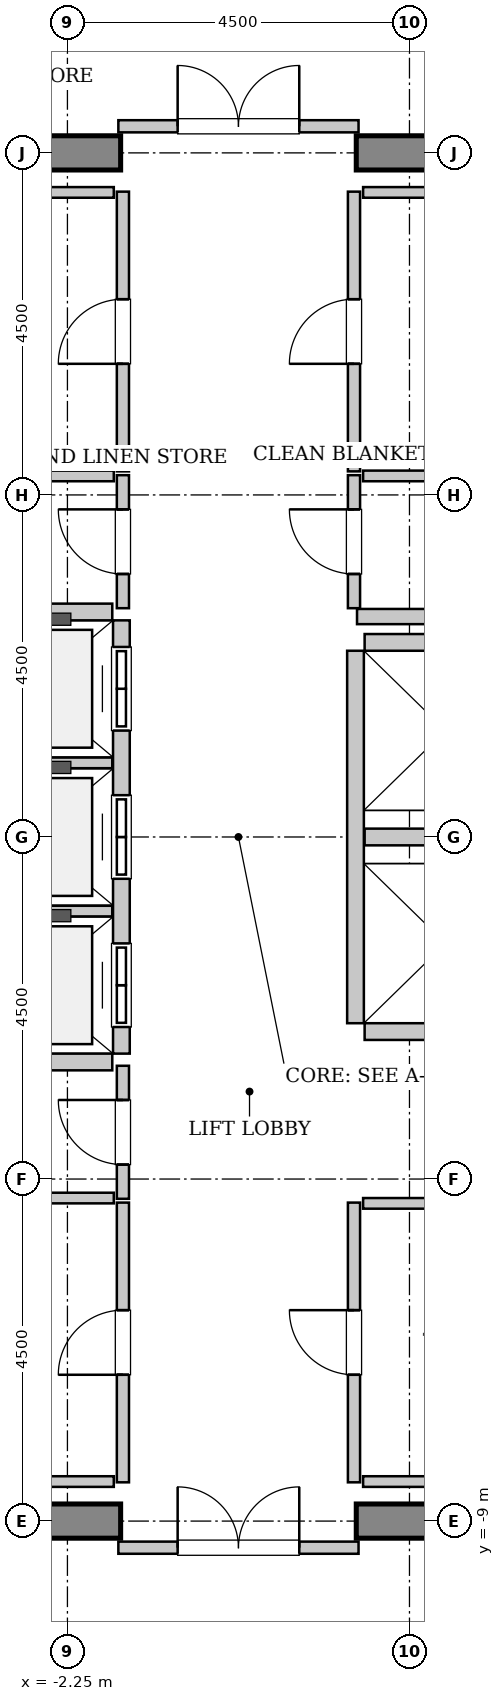
"""IFC4 building model, lengths in metres.
Left out: names, types, materials, properties, quantities, classifications, styles, units other than length and angle.
Written with IfcOpenShell. Run it as: python <this file> out.ifc"""

import sys

from ifc_helpers import new_model, si_unit, direction, frame, frame_2d, origin, place, context, subcontext, project, spatial, rectangle, extrude, source, transform, mapped, element, fill, save


model = new_model("IFC4")
c1 = context("Model", 3, precision=1e-05, world=origin(), true_north=direction((0.0, 1.0)))
c2 = subcontext(c1, "Body", "Model", "MODEL_VIEW")
j1 = project(units=[si_unit("LENGTHUNIT", "METRE"), si_unit("PLANEANGLEUNIT", "RADIAN")], contexts=[c1])
p1 = place(None, origin())
s1 = spatial("IfcSite", under=j1, at=p1, CompositionType="ELEMENT")
p2 = place(p1, origin())
s2 = spatial("IfcBuilding", under=s1, at=p2, CompositionType="ELEMENT")
p3 = place(p2, frame((0.0, 0.0, 268.4)))
s3 = spatial("IfcBuildingStorey", under=s2, at=p3, CompositionType="ELEMENT", Elevation=268.4)
m1 = source(origin(), c2, "Body", "SweptSolid", [
    extrude(rectangle(XDim=9.925, YDim=0.45, at=frame_2d((4.962, 0.0))), origin(), (0.0, 0.0, 1.0), 3.8),
])
for number, where, z_axis, x_axis in (
    (1, (-11.475, 9.0, 0.0), (0.0, 0.0, 1.0), (1.0, 0.0, 0.0)),
    (2, (1.55, 9.0, 0.0), (0.0, 0.0, 1.0), (1.0, 0.0, 0.0)),
    (3, (-11.475, -9.0, 0.0), (0.0, 0.0, 1.0), (1.0, 0.0, 0.0)),
    (4, (1.55, -9.0, 0.0), (0.0, 0.0, 1.0), (1.0, 0.0, 0.0)),
):
    element("IfcWall", number, at=place(p3, frame(where, z_axis=z_axis, x_axis=x_axis)), inside=s3, PredefinedType="SHEAR", context=c2, shape_type="MappedRepresentation", body=[
        mapped(m1, transform((0.0, 0.0, 0.0), x_axis=(1.0, 0.0, 0.0), y_axis=(0.0, 1.0, 0.0), z_axis=(0.0, 0.0, 1.0), scale=1.0)),
    ])
m2 = source(origin(), c2, "Body", "SweptSolid", [
    extrude(rectangle(XDim=5.7, YDim=0.22, at=frame_2d((2.85, 0.0))), origin(), (0.0, 0.0, 1.0), 3.535),
])
p4 = place(p3, frame((-1.54, -2.85, 0.0), z_axis=(0.0, 0.0, 1.0), x_axis=(0.0, 1.0, 0.0)))
e5 = element("IfcWall", 5, at=p4, inside=s3, PredefinedType="SOLIDWALL", context=c2, shape_type="MappedRepresentation", body=[
    mapped(m2, transform((0.0, 0.0, 0.0), x_axis=(1.0, 0.0, 0.0), y_axis=(0.0, 1.0, 0.0), z_axis=(0.0, 0.0, 1.0), scale=1.0)),
])
p5 = place(p4, frame((0.35, 0.0, 0.0)))
e6 = element("IfcOpeningElement", 6, at=p5, cuts=e5, PredefinedType="OPENING", context=c2, shape_type="SweptSolid", body=[
    extrude(rectangle(XDim=1.1, YDim=2.2, at=frame_2d((0.55, 1.1))), frame((0.0, 0.12, 0.0), z_axis=(0.0, -1.0, 0.0), x_axis=(1.0, 0.0, 0.0)), (0.0, 0.0, 1.0), 0.24),
])
p6 = place(p4, frame((2.3, 0.0, 0.0)))
e7 = element("IfcOpeningElement", 7, at=p6, cuts=e5, PredefinedType="OPENING", context=c2, shape_type="SweptSolid", body=[
    extrude(rectangle(XDim=1.1, YDim=2.2, at=frame_2d((0.55, 1.1))), frame((0.0, 0.12, 0.0), z_axis=(0.0, -1.0, 0.0), x_axis=(1.0, 0.0, 0.0)), (0.0, 0.0, 1.0), 0.24),
])
p7 = place(p4, frame((4.25, 0.0, 0.0)))
e8 = element("IfcOpeningElement", 8, at=p7, cuts=e5, PredefinedType="OPENING", context=c2, shape_type="SweptSolid", body=[
    extrude(rectangle(XDim=1.1, YDim=2.2, at=frame_2d((0.55, 1.1))), frame((0.0, 0.12, 0.0), z_axis=(0.0, -1.0, 0.0), x_axis=(1.0, 0.0, 0.0)), (0.0, 0.0, 1.0), 0.24),
])
m3 = source(origin(), c2, "Body", "SweptSolid", [
    extrude(rectangle(XDim=2.13, YDim=0.22, at=frame_2d((1.065, 0.0))), origin(), (0.0, 0.0, 1.0), 3.535),
])
p8 = place(p3, frame((-3.79, -2.96, 0.0), z_axis=(0.0, 0.0, 1.0), x_axis=(1.0, 0.0, 0.0)))
e9 = element("IfcWall", 9, at=p8, inside=s3, PredefinedType="SOLIDWALL", context=c2, shape_type="MappedRepresentation", body=[
    mapped(m3, transform((0.0, 0.0, 0.0), x_axis=(1.0, 0.0, 0.0), y_axis=(0.0, 1.0, 0.0), z_axis=(0.0, 0.0, 1.0), scale=1.0)),
])
m4 = source(origin(), c2, "Body", "SweptSolid", [
    extrude(rectangle(XDim=2.13, YDim=0.14, at=frame_2d((1.065, 0.0))), origin(), (0.0, 0.0, 1.0), 3.535),
])
for number, where, z_axis, x_axis in (
    (10, (-3.79, -0.975, 0.0), (0.0, 0.0, 1.0), (1.0, 0.0, 0.0)),
    (11, (-3.79, 0.975, 0.0), (0.0, 0.0, 1.0), (1.0, 0.0, 0.0)),
):
    element("IfcWall", number, at=place(p3, frame(where, z_axis=z_axis, x_axis=x_axis)), inside=s3, PredefinedType="PARTITIONING", context=c2, shape_type="MappedRepresentation", body=[
        mapped(m4, transform((0.0, 0.0, 0.0), x_axis=(1.0, 0.0, 0.0), y_axis=(0.0, 1.0, 0.0), z_axis=(0.0, 0.0, 1.0), scale=1.0)),
    ])
p9 = place(p3, frame((-1.66, 2.96, 0.0), z_axis=(0.0, 0.0, 1.0), x_axis=(-1.0, 0.0, 0.0)))
e12 = element("IfcWall", 12, at=p9, inside=s3, PredefinedType="SOLIDWALL", context=c2, shape_type="MappedRepresentation", body=[
    mapped(m3, transform((0.0, 0.0, 0.0), x_axis=(1.0, 0.0, 0.0), y_axis=(0.0, 1.0, 0.0), z_axis=(0.0, 0.0, 1.0), scale=1.0)),
])
m5 = source(origin(), c2, "Body", "SweptSolid", [
    extrude(rectangle(XDim=4.9, YDim=0.22, at=frame_2d((2.45, 0.0))), origin(), (0.0, 0.0, 1.0), 3.535),
])
p10 = place(p3, frame((1.54, 2.45, 0.0), z_axis=(0.0, 0.0, 1.0), x_axis=(0.0, -1.0, 0.0)))
e13 = element("IfcWall", 13, at=p10, inside=s3, PredefinedType="SOLIDWALL", context=c2, shape_type="MappedRepresentation", body=[
    mapped(m5, transform((0.0, 0.0, 0.0), x_axis=(1.0, 0.0, 0.0), y_axis=(0.0, 1.0, 0.0), z_axis=(0.0, 0.0, 1.0), scale=1.0)),
])
for number, where, z_axis, x_axis in (
    (14, (1.66, -2.56, 0.0), (0.0, 0.0, 1.0), (1.0, 0.0, 0.0)),
    (15, (1.66, 0.0, 0.0), (0.0, 0.0, 1.0), (1.0, 0.0, 0.0)),
    (16, (3.79, 2.56, 0.0), (0.0, 0.0, 1.0), (-1.0, 0.0, 0.0)),
):
    element("IfcWall", number, at=place(p3, frame(where, z_axis=z_axis, x_axis=x_axis)), inside=s3, PredefinedType="SOLIDWALL", context=c2, shape_type="MappedRepresentation", body=[
        mapped(m3, transform((0.0, 0.0, 0.0), x_axis=(1.0, 0.0, 0.0), y_axis=(0.0, 1.0, 0.0), z_axis=(0.0, 0.0, 1.0), scale=1.0)),
    ])
m6 = source(origin(), c2, "Body", "SweptSolid", [
    extrude(rectangle(XDim=2.52, YDim=0.2, at=frame_2d((1.26, 0.0))), origin(), (0.0, 0.0, 1.0), 3.535),
])
p11 = place(p3, frame((1.56, 2.9, 0.0), z_axis=(0.0, 0.0, 1.0), x_axis=(1.0, 0.0, 0.0)))
e17 = element("IfcWall", 17, at=p11, inside=s3, PredefinedType="PARTITIONING", context=c2, shape_type="MappedRepresentation", body=[
    mapped(m6, transform((0.0, 0.0, 0.0), x_axis=(1.0, 0.0, 0.0), y_axis=(0.0, 1.0, 0.0), z_axis=(0.0, 0.0, 1.0), scale=1.0)),
])
m7 = source(origin(), c2, "Body", "SweptSolid", [
    extrude(rectangle(XDim=3.16, YDim=0.16, at=frame_2d((1.58, 0.0))), origin(), (0.0, 0.0, 1.0), 2.625),
])
p12 = place(p3, frame((-1.58, 9.35, 0.0), z_axis=(0.0, 0.0, 1.0), x_axis=(1.0, 0.0, 0.0)))
e18 = element("IfcWall", 18, at=p12, inside=s3, PredefinedType="PARTITIONING", context=c2, shape_type="MappedRepresentation", body=[
    mapped(m7, transform((0.0, 0.0, 0.0), x_axis=(1.0, 0.0, 0.0), y_axis=(0.0, 1.0, 0.0), z_axis=(0.0, 0.0, 1.0), scale=1.0)),
])
p13 = place(p12, frame((0.78, 0.0, 0.0)))
e19 = element("IfcOpeningElement", 19, at=p13, cuts=e18, PredefinedType="OPENING", context=c2, shape_type="SweptSolid", body=[
    extrude(rectangle(XDim=1.6, YDim=2.3, at=frame_2d((0.8, 1.15))), frame((0.0, 0.09, 0.0), z_axis=(0.0, -1.0, 0.0), x_axis=(1.0, 0.0, 0.0)), (0.0, 0.0, 1.0), 0.18),
])
p14 = place(p3, frame((-1.58, -9.35, 0.0), z_axis=(0.0, 0.0, 1.0), x_axis=(1.0, 0.0, 0.0)))
e20 = element("IfcWall", 20, at=p14, inside=s3, PredefinedType="PARTITIONING", context=c2, shape_type="MappedRepresentation", body=[
    mapped(m7, transform((0.0, 0.0, 0.0), x_axis=(1.0, 0.0, 0.0), y_axis=(0.0, 1.0, 0.0), z_axis=(0.0, 0.0, 1.0), scale=1.0)),
])
p15 = place(p14, frame((0.78, 0.0, 0.0)))
e21 = element("IfcOpeningElement", 21, at=p15, cuts=e20, PredefinedType="OPENING", context=c2, shape_type="SweptSolid", body=[
    extrude(rectangle(XDim=1.6, YDim=2.3, at=frame_2d((0.8, 1.15))), frame((0.0, 0.09, 0.0), z_axis=(0.0, -1.0, 0.0), x_axis=(1.0, 0.0, 0.0)), (0.0, 0.0, 1.0), 0.18),
])
m8 = source(origin(), c2, "Body", "SweptSolid", [
    extrude(rectangle(XDim=1.75, YDim=0.16, at=frame_2d((0.875, 0.0))), origin(), (0.0, 0.0, 1.0), 3.535),
])
p16 = place(p3, frame((-1.52, 3.01, 0.0), z_axis=(0.0, 0.0, 1.0), x_axis=(0.0, 1.0, 0.0)))
e22 = element("IfcWall", 22, at=p16, inside=s3, PredefinedType="PARTITIONING", context=c2, shape_type="MappedRepresentation", body=[
    mapped(m8, transform((0.0, 0.0, 0.0), x_axis=(1.0, 0.0, 0.0), y_axis=(0.0, 1.0, 0.0), z_axis=(0.0, 0.0, 1.0), scale=1.0)),
])
p17 = place(p16, frame((0.45, 0.0, 0.0)))
e23 = element("IfcOpeningElement", 23, at=p17, cuts=e22, PredefinedType="OPENING", context=c2, shape_type="SweptSolid", body=[
    extrude(rectangle(XDim=0.85, YDim=2.1, at=frame_2d((0.425, 1.05))), frame((0.0, 0.09, 0.0), z_axis=(0.0, -1.0, 0.0), x_axis=(1.0, 0.0, 0.0)), (0.0, 0.0, 1.0), 0.18),
])
m9 = source(origin(), c2, "Body", "SweptSolid", [
    extrude(rectangle(XDim=2.95, YDim=0.14, at=frame_2d((1.475, 0.0))), origin(), (0.0, 0.0, 1.0), 3.535),
])
p18 = place(p3, frame((-4.59, 4.75, 0.0), z_axis=(0.0, 0.0, 1.0), x_axis=(1.0, 0.0, 0.0)))
e24 = element("IfcWall", 24, at=p18, inside=s3, PredefinedType="PARTITIONING", context=c2, shape_type="MappedRepresentation", body=[
    mapped(m9, transform((0.0, 0.0, 0.0), x_axis=(1.0, 0.0, 0.0), y_axis=(0.0, 1.0, 0.0), z_axis=(0.0, 0.0, 1.0), scale=1.0)),
])
m10 = source(origin(), c2, "Body", "SweptSolid", [
    extrude(rectangle(XDim=3.68, YDim=0.16, at=frame_2d((1.84, 0.0))), origin(), (0.0, 0.0, 1.0), 3.535),
])
p19 = place(p3, frame((-1.52, 4.81, 0.0), z_axis=(0.0, 0.0, 1.0), x_axis=(0.0, 1.0, 0.0)))
e25 = element("IfcWall", 25, at=p19, inside=s3, PredefinedType="PARTITIONING", context=c2, shape_type="MappedRepresentation", body=[
    mapped(m10, transform((0.0, 0.0, 0.0), x_axis=(1.0, 0.0, 0.0), y_axis=(0.0, 1.0, 0.0), z_axis=(0.0, 0.0, 1.0), scale=1.0)),
])
p20 = place(p19, frame((1.415, 0.0, 0.0)))
e26 = element("IfcOpeningElement", 26, at=p20, cuts=e25, PredefinedType="OPENING", context=c2, shape_type="SweptSolid", body=[
    extrude(rectangle(XDim=0.85, YDim=2.1, at=frame_2d((0.425, 1.05))), frame((0.0, 0.09, 0.0), z_axis=(0.0, -1.0, 0.0), x_axis=(1.0, 0.0, 0.0)), (0.0, 0.0, 1.0), 0.18),
])
m11 = source(origin(), c2, "Body", "SweptSolid", [
    extrude(rectangle(XDim=3.15, YDim=0.14, at=frame_2d((1.575, 0.0))), origin(), (0.0, 0.0, 1.0), 3.535),
])
p21 = place(p3, frame((-4.79, 8.48, 0.0), z_axis=(0.0, 0.0, 1.0), x_axis=(1.0, 0.0, 0.0)))
e27 = element("IfcWall", 27, at=p21, inside=s3, PredefinedType="PARTITIONING", context=c2, shape_type="MappedRepresentation", body=[
    mapped(m11, transform((0.0, 0.0, 0.0), x_axis=(1.0, 0.0, 0.0), y_axis=(0.0, 1.0, 0.0), z_axis=(0.0, 0.0, 1.0), scale=1.0)),
])
p22 = place(p3, frame((1.52, 3.01, 0.0), z_axis=(0.0, 0.0, 1.0), x_axis=(0.0, 1.0, 0.0)))
e28 = element("IfcWall", 28, at=p22, inside=s3, PredefinedType="PARTITIONING", context=c2, shape_type="MappedRepresentation", body=[
    mapped(m8, transform((0.0, 0.0, 0.0), x_axis=(1.0, 0.0, 0.0), y_axis=(0.0, 1.0, 0.0), z_axis=(0.0, 0.0, 1.0), scale=1.0)),
])
p23 = place(p22, frame((0.45, 0.0, 0.0)))
e29 = element("IfcOpeningElement", 29, at=p23, cuts=e28, PredefinedType="OPENING", context=c2, shape_type="SweptSolid", body=[
    extrude(rectangle(XDim=0.85, YDim=2.1, at=frame_2d((0.425, 1.05))), frame((0.0, 0.09, 0.0), z_axis=(0.0, -1.0, 0.0), x_axis=(1.0, 0.0, 0.0)), (0.0, 0.0, 1.0), 0.18),
])
p24 = place(p3, frame((1.64, 4.75, 0.0), z_axis=(0.0, 0.0, 1.0), x_axis=(1.0, 0.0, 0.0)))
e30 = element("IfcWall", 30, at=p24, inside=s3, PredefinedType="PARTITIONING", context=c2, shape_type="MappedRepresentation", body=[
    mapped(m11, transform((0.0, 0.0, 0.0), x_axis=(1.0, 0.0, 0.0), y_axis=(0.0, 1.0, 0.0), z_axis=(0.0, 0.0, 1.0), scale=1.0)),
])
p25 = place(p3, frame((1.52, 4.81, 0.0), z_axis=(0.0, 0.0, 1.0), x_axis=(0.0, 1.0, 0.0)))
e31 = element("IfcWall", 31, at=p25, inside=s3, PredefinedType="PARTITIONING", context=c2, shape_type="MappedRepresentation", body=[
    mapped(m10, transform((0.0, 0.0, 0.0), x_axis=(1.0, 0.0, 0.0), y_axis=(0.0, 1.0, 0.0), z_axis=(0.0, 0.0, 1.0), scale=1.0)),
])
p26 = place(p25, frame((1.415, 0.0, 0.0)))
e32 = element("IfcOpeningElement", 32, at=p26, cuts=e31, PredefinedType="OPENING", context=c2, shape_type="SweptSolid", body=[
    extrude(rectangle(XDim=0.85, YDim=2.1, at=frame_2d((0.425, 1.05))), frame((0.0, 0.09, 0.0), z_axis=(0.0, -1.0, 0.0), x_axis=(1.0, 0.0, 0.0)), (0.0, 0.0, 1.0), 0.18),
])
p27 = place(p3, frame((1.64, 8.48, 0.0), z_axis=(0.0, 0.0, 1.0), x_axis=(1.0, 0.0, 0.0)))
e33 = element("IfcWall", 33, at=p27, inside=s3, PredefinedType="PARTITIONING", context=c2, shape_type="MappedRepresentation", body=[
    mapped(m11, transform((0.0, 0.0, 0.0), x_axis=(1.0, 0.0, 0.0), y_axis=(0.0, 1.0, 0.0), z_axis=(0.0, 0.0, 1.0), scale=1.0)),
])
p28 = place(p3, frame((-1.52, -4.76, 0.0), z_axis=(0.0, 0.0, 1.0), x_axis=(0.0, 1.0, 0.0)))
e34 = element("IfcWall", 34, at=p28, inside=s3, PredefinedType="PARTITIONING", context=c2, shape_type="MappedRepresentation", body=[
    mapped(m8, transform((0.0, 0.0, 0.0), x_axis=(1.0, 0.0, 0.0), y_axis=(0.0, 1.0, 0.0), z_axis=(0.0, 0.0, 1.0), scale=1.0)),
])
p29 = place(p28, frame((0.45, 0.0, 0.0)))
e35 = element("IfcOpeningElement", 35, at=p29, cuts=e34, PredefinedType="OPENING", context=c2, shape_type="SweptSolid", body=[
    extrude(rectangle(XDim=0.85, YDim=2.1, at=frame_2d((0.425, 1.05))), frame((0.0, 0.09, 0.0), z_axis=(0.0, -1.0, 0.0), x_axis=(1.0, 0.0, 0.0)), (0.0, 0.0, 1.0), 0.18),
])
p30 = place(p3, frame((-4.79, -4.75, 0.0), z_axis=(0.0, 0.0, 1.0), x_axis=(1.0, 0.0, 0.0)))
e36 = element("IfcWall", 36, at=p30, inside=s3, PredefinedType="PARTITIONING", context=c2, shape_type="MappedRepresentation", body=[
    mapped(m11, transform((0.0, 0.0, 0.0), x_axis=(1.0, 0.0, 0.0), y_axis=(0.0, 1.0, 0.0), z_axis=(0.0, 0.0, 1.0), scale=1.0)),
])
p31 = place(p3, frame((-1.52, -8.49, 0.0), z_axis=(0.0, 0.0, 1.0), x_axis=(0.0, 1.0, 0.0)))
e37 = element("IfcWall", 37, at=p31, inside=s3, PredefinedType="PARTITIONING", context=c2, shape_type="MappedRepresentation", body=[
    mapped(m10, transform((0.0, 0.0, 0.0), x_axis=(1.0, 0.0, 0.0), y_axis=(0.0, 1.0, 0.0), z_axis=(0.0, 0.0, 1.0), scale=1.0)),
])
p32 = place(p31, frame((1.415, 0.0, 0.0)))
e38 = element("IfcOpeningElement", 38, at=p32, cuts=e37, PredefinedType="OPENING", context=c2, shape_type="SweptSolid", body=[
    extrude(rectangle(XDim=0.85, YDim=2.1, at=frame_2d((0.425, 1.05))), frame((0.0, 0.09, 0.0), z_axis=(0.0, -1.0, 0.0), x_axis=(1.0, 0.0, 0.0)), (0.0, 0.0, 1.0), 0.18),
])
m12 = source(origin(), c2, "Body", "SweptSolid", [
    extrude(rectangle(XDim=3.03, YDim=0.14, at=frame_2d((1.515, 0.0))), origin(), (0.0, 0.0, 1.0), 3.535),
])
p33 = place(p3, frame((-4.67, -8.48, 0.0), z_axis=(0.0, 0.0, 1.0), x_axis=(1.0, 0.0, 0.0)))
e39 = element("IfcWall", 39, at=p33, inside=s3, PredefinedType="PARTITIONING", context=c2, shape_type="MappedRepresentation", body=[
    mapped(m12, transform((0.0, 0.0, 0.0), x_axis=(1.0, 0.0, 0.0), y_axis=(0.0, 1.0, 0.0), z_axis=(0.0, 0.0, 1.0), scale=1.0)),
])
p34 = place(p3, frame((1.52, -8.49, 0.0), z_axis=(0.0, 0.0, 1.0), x_axis=(0.0, 1.0, 0.0)))
e40 = element("IfcWall", 40, at=p34, inside=s3, PredefinedType="PARTITIONING", context=c2, shape_type="MappedRepresentation", body=[
    mapped(m10, transform((0.0, 0.0, 0.0), x_axis=(1.0, 0.0, 0.0), y_axis=(0.0, 1.0, 0.0), z_axis=(0.0, 0.0, 1.0), scale=1.0)),
])
p35 = place(p34, frame((1.415, 0.0, 0.0)))
e41 = element("IfcOpeningElement", 41, at=p35, cuts=e40, PredefinedType="OPENING", context=c2, shape_type="SweptSolid", body=[
    extrude(rectangle(XDim=0.85, YDim=2.1, at=frame_2d((0.425, 1.05))), frame((0.0, 0.09, 0.0), z_axis=(0.0, -1.0, 0.0), x_axis=(1.0, 0.0, 0.0)), (0.0, 0.0, 1.0), 0.18),
])
p36 = place(p3, frame((1.64, -4.82, 0.0), z_axis=(0.0, 0.0, 1.0), x_axis=(1.0, 0.0, 0.0)))
e42 = element("IfcWall", 42, at=p36, inside=s3, PredefinedType="PARTITIONING", context=c2, shape_type="MappedRepresentation", body=[
    mapped(m9, transform((0.0, 0.0, 0.0), x_axis=(1.0, 0.0, 0.0), y_axis=(0.0, 1.0, 0.0), z_axis=(0.0, 0.0, 1.0), scale=1.0)),
])
p37 = place(p3, frame((1.64, -8.48, 0.0), z_axis=(0.0, 0.0, 1.0), x_axis=(1.0, 0.0, 0.0)))
e43 = element("IfcWall", 43, at=p37, inside=s3, PredefinedType="PARTITIONING", context=c2, shape_type="MappedRepresentation", body=[
    mapped(m11, transform((0.0, 0.0, 0.0), x_axis=(1.0, 0.0, 0.0), y_axis=(0.0, 1.0, 0.0), z_axis=(0.0, 0.0, 1.0), scale=1.0)),
])
m13 = source(origin(), c2, "Body", "SweptSolid", [
    extrude(rectangle(XDim=1.1, YDim=2.2, at=frame_2d((0.55, 1.1))), frame((0.0, 0.025, 0.0), z_axis=(0.0, -1.0, 0.0), x_axis=(1.0, 0.0, 0.0)), (0.0, 0.0, 1.0), 0.05),
])
p38 = place(p5, origin())
e44 = element("IfcDoor", 44, at=p38, inside=s3, OperationType="DOUBLE_DOOR_SLIDING", PredefinedType="DOOR", context=c2, shape_type="MappedRepresentation", body=[
    mapped(m13, transform((0.0, 0.0, 0.0), x_axis=(1.0, 0.0, 0.0), y_axis=(0.0, 1.0, 0.0), z_axis=(0.0, 0.0, 1.0), scale=1.0)),
])
fill(e6, e44)
p39 = place(p6, origin())
e45 = element("IfcDoor", 45, at=p39, inside=s3, OperationType="DOUBLE_DOOR_SLIDING", PredefinedType="DOOR", context=c2, shape_type="MappedRepresentation", body=[
    mapped(m13, transform((0.0, 0.0, 0.0), x_axis=(1.0, 0.0, 0.0), y_axis=(0.0, 1.0, 0.0), z_axis=(0.0, 0.0, 1.0), scale=1.0)),
])
fill(e7, e45)
p40 = place(p7, origin())
e46 = element("IfcDoor", 46, at=p40, inside=s3, OperationType="DOUBLE_DOOR_SLIDING", PredefinedType="DOOR", context=c2, shape_type="MappedRepresentation", body=[
    mapped(m13, transform((0.0, 0.0, 0.0), x_axis=(1.0, 0.0, 0.0), y_axis=(0.0, 1.0, 0.0), z_axis=(0.0, 0.0, 1.0), scale=1.0)),
])
fill(e8, e46)
m14 = source(origin(), c2, "Body", "SweptSolid", [
    extrude(rectangle(XDim=1.6, YDim=2.3, at=frame_2d((0.8, 1.15))), frame((0.0, 0.025, 0.0), z_axis=(0.0, -1.0, 0.0), x_axis=(1.0, 0.0, 0.0)), (0.0, 0.0, 1.0), 0.05),
])
p41 = place(p13, origin())
e47 = element("IfcDoor", 47, at=p41, inside=s3, OperationType="DOUBLE_DOOR_SINGLE_SWING", PredefinedType="DOOR", context=c2, shape_type="MappedRepresentation", body=[
    mapped(m14, transform((0.0, 0.0, 0.0), x_axis=(1.0, 0.0, 0.0), y_axis=(0.0, 1.0, 0.0), z_axis=(0.0, 0.0, 1.0), scale=1.0)),
])
fill(e19, e47)
p42 = place(p15, origin())
e48 = element("IfcDoor", 48, at=p42, inside=s3, OperationType="DOUBLE_DOOR_SINGLE_SWING", PredefinedType="DOOR", context=c2, shape_type="MappedRepresentation", body=[
    mapped(m14, transform((0.0, 0.0, 0.0), x_axis=(1.0, 0.0, 0.0), y_axis=(0.0, 1.0, 0.0), z_axis=(0.0, 0.0, 1.0), scale=1.0)),
])
fill(e21, e48)
m15 = source(origin(), c2, "Body", "SweptSolid", [
    extrude(rectangle(XDim=0.85, YDim=2.1, at=frame_2d((0.425, 1.05))), frame((0.0, 0.025, 0.0), z_axis=(0.0, -1.0, 0.0), x_axis=(1.0, 0.0, 0.0)), (0.0, 0.0, 1.0), 0.05),
])
p43 = place(p17, origin())
e49 = element("IfcDoor", 49, at=p43, inside=s3, OperationType="SINGLE_SWING_RIGHT", PredefinedType="DOOR", context=c2, shape_type="MappedRepresentation", body=[
    mapped(m15, transform((0.0, 0.0, 0.0), x_axis=(1.0, 0.0, 0.0), y_axis=(0.0, 1.0, 0.0), z_axis=(0.0, 0.0, 1.0), scale=1.0)),
])
fill(e23, e49)
p44 = place(p20, origin())
e50 = element("IfcDoor", 50, at=p44, inside=s3, OperationType="SINGLE_SWING_LEFT", PredefinedType="DOOR", context=c2, shape_type="MappedRepresentation", body=[
    mapped(m15, transform((0.0, 0.0, 0.0), x_axis=(1.0, 0.0, 0.0), y_axis=(0.0, 1.0, 0.0), z_axis=(0.0, 0.0, 1.0), scale=1.0)),
])
fill(e26, e50)
p45 = place(p23, origin())
e51 = element("IfcDoor", 51, at=p45, inside=s3, OperationType="SINGLE_SWING_RIGHT", PredefinedType="DOOR", context=c2, shape_type="MappedRepresentation", body=[
    mapped(m15, transform((0.0, 0.0, 0.0), x_axis=(1.0, 0.0, 0.0), y_axis=(0.0, 1.0, 0.0), z_axis=(0.0, 0.0, 1.0), scale=1.0)),
])
fill(e29, e51)
p46 = place(p26, origin())
e52 = element("IfcDoor", 52, at=p46, inside=s3, OperationType="SINGLE_SWING_LEFT", PredefinedType="DOOR", context=c2, shape_type="MappedRepresentation", body=[
    mapped(m15, transform((0.0, 0.0, 0.0), x_axis=(1.0, 0.0, 0.0), y_axis=(0.0, 1.0, 0.0), z_axis=(0.0, 0.0, 1.0), scale=1.0)),
])
fill(e32, e52)
p47 = place(p29, origin())
e53 = element("IfcDoor", 53, at=p47, inside=s3, OperationType="SINGLE_SWING_RIGHT", PredefinedType="DOOR", context=c2, shape_type="MappedRepresentation", body=[
    mapped(m15, transform((0.0, 0.0, 0.0), x_axis=(1.0, 0.0, 0.0), y_axis=(0.0, 1.0, 0.0), z_axis=(0.0, 0.0, 1.0), scale=1.0)),
])
fill(e35, e53)
p48 = place(p32, origin())
e54 = element("IfcDoor", 54, at=p48, inside=s3, OperationType="SINGLE_SWING_LEFT", PredefinedType="DOOR", context=c2, shape_type="MappedRepresentation", body=[
    mapped(m15, transform((0.0, 0.0, 0.0), x_axis=(1.0, 0.0, 0.0), y_axis=(0.0, 1.0, 0.0), z_axis=(0.0, 0.0, 1.0), scale=1.0)),
])
fill(e38, e54)
p49 = place(p35, origin())
e55 = element("IfcDoor", 55, at=p49, inside=s3, OperationType="SINGLE_SWING_RIGHT", PredefinedType="DOOR", context=c2, shape_type="MappedRepresentation", body=[
    mapped(m15, transform((0.0, 0.0, 0.0), x_axis=(1.0, 0.0, 0.0), y_axis=(0.0, 1.0, 0.0), z_axis=(0.0, 0.0, 1.0), scale=1.0)),
])
fill(e41, e55)
save(model, sys.argv[1])
